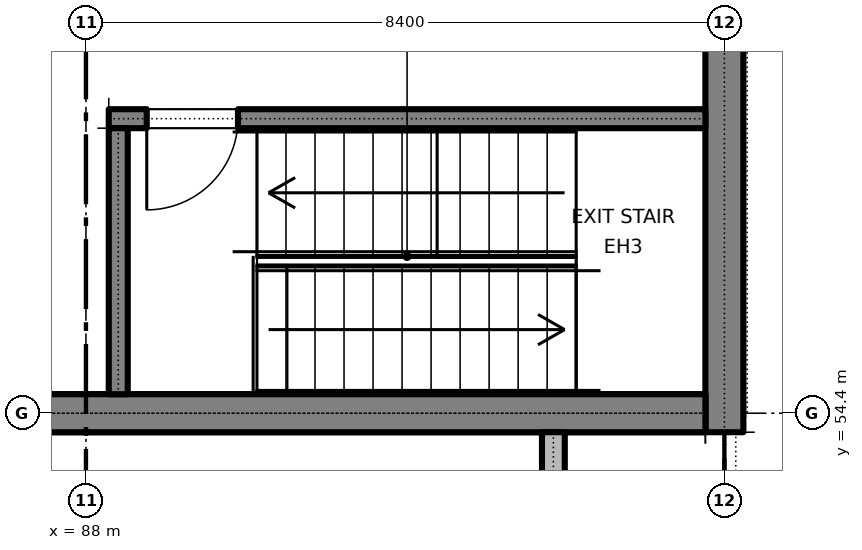
"""IFC4 building model, lengths in metres.
Left out: names, types, materials, properties, quantities, classifications, styles, units other than length and angle.
Written with IfcOpenShell. Run it as: python <this file> out.ifc"""

import sys

from ifc_helpers import new_model, si_unit, direction, frame, frame_2d, origin, place, context, subcontext, project, spatial, rectangle, extrude, element, fill, save


model = new_model("IFC4")
c1 = context("Model", 3, precision=1e-05, world=origin(), true_north=direction((0.0, 1.0)))
c2 = subcontext(c1, "Body", "Model", "MODEL_VIEW")
j1 = project(units=[si_unit("LENGTHUNIT", "METRE"), si_unit("PLANEANGLEUNIT", "RADIAN")], contexts=[c1])
p1 = place(None, origin())
s1 = spatial("IfcSite", under=j1, at=p1, CompositionType="ELEMENT")
p2 = place(p1, origin())
s2 = spatial("IfcBuilding", under=s1, at=p2, CompositionType="ELEMENT")
p3 = place(p2, frame((0.0, 0.0, 15.0)))
s3 = spatial("IfcBuildingStorey", under=s2, at=p3, CompositionType="ELEMENT", Elevation=15.0)
p4 = place(p3, frame((96.4, 54.15, 0.0), z_axis=(0.0, 0.0, 1.0), x_axis=(0.0, 1.0, 0.0)))
e1 = element("IfcWall", 1, at=p4, inside=s3, PredefinedType="SOLIDWALL", context=c2, shape_type="SweptSolid", body=[
    extrude(rectangle(XDim=42.5, YDim=0.5, at=frame_2d((21.25, 0.0))), origin(), (0.0, 0.0, 1.0), 4.2),
])
p5 = place(p3, frame((85.9, 54.4, 0.0), z_axis=(0.0, 0.0, 1.0), x_axis=(1.0, 0.0, 0.0)))
e2 = element("IfcWall", 2, at=p5, inside=s3, PredefinedType="SOLIDWALL", context=c2, shape_type="SweptSolid", body=[
    extrude(rectangle(XDim=10.25, YDim=0.5, at=frame_2d((5.125, 0.0))), origin(), (0.0, 0.0, 1.0), 3.0),
])
p6 = place(p3, frame((29.45, 54.4, 3.0), z_axis=(0.0, 0.0, 1.0), x_axis=(1.0, 0.0, 0.0)))
e3 = element("IfcWall", 3, at=p6, inside=s3, PredefinedType="SOLIDWALL", context=c2, shape_type="SweptSolid", body=[
    extrude(rectangle(XDim=66.7, YDim=0.5, at=frame_2d((33.35, 0.0))), origin(), (0.0, 0.0, 1.0), 1.2),
])
p7 = place(p3, frame((88.3, 58.275, 0.0), z_axis=(0.0, 0.0, 1.0), x_axis=(1.0, 0.0, 0.0)))
e4 = element("IfcWall", 4, at=p7, inside=s3, PredefinedType="SOLIDWALL", context=c2, shape_type="SweptSolid", body=[
    extrude(rectangle(XDim=7.85, YDim=0.25, at=frame_2d((3.925, 0.0))), origin(), (0.0, 0.0, 1.0), 4.2),
])
p8 = place(p7, frame((0.5, 0.0, 0.0)))
e5 = element("IfcOpeningElement", 5, at=p8, cuts=e4, PredefinedType="OPENING", context=c2, shape_type="SweptSolid", body=[
    extrude(rectangle(XDim=1.2, YDim=2.1, at=frame_2d((0.6, 1.05))), frame((0.0, 0.135, 0.0), z_axis=(0.0, -1.0, 0.0), x_axis=(1.0, 0.0, 0.0)), (0.0, 0.0, 1.0), 0.27),
])
p9 = place(p3, frame((88.425, 54.65, 0.0), z_axis=(0.0, 0.0, 1.0), x_axis=(0.0, 1.0, 0.0)))
e6 = element("IfcWall", 6, at=p9, inside=s3, PredefinedType="SOLIDWALL", context=c2, shape_type="SweptSolid", body=[
    extrude(rectangle(XDim=3.5, YDim=0.25, at=frame_2d((1.75, 0.0))), origin(), (0.0, 0.0, 1.0), 4.2),
])
p10 = place(p3, frame((94.15, 4.15, 0.17), z_axis=(0.0, 0.0, 1.0), x_axis=(0.0, 1.0, 0.0)))
e7 = element("IfcWall", 7, at=p10, inside=s3, PredefinedType="PARAPET", context=c2, shape_type="SweptSolid", body=[
    extrude(rectangle(XDim=50.0, YDim=0.3, at=frame_2d((25.0, 0.0))), origin(), (0.0, 0.0, 1.0), 1.1),
])
p11 = place(p8, frame((1.2, 0.0, 0.0), z_axis=(0.0, 0.0, 1.0), x_axis=(-1.0, 0.0, 0.0)))
e8 = element("IfcDoor", 8, at=p11, inside=s3, OperationType="SINGLE_SWING_RIGHT", PredefinedType="DOOR", context=c2, shape_type="SweptSolid", body=[
    extrude(rectangle(XDim=1.2, YDim=2.1, at=frame_2d((0.6, 1.05))), frame((0.0, 0.025, 0.0), z_axis=(0.0, -1.0, 0.0), x_axis=(1.0, 0.0, 0.0)), (0.0, 0.0, 1.0), 0.05),
])
fill(e5, e8)
save(model, sys.argv[1])
